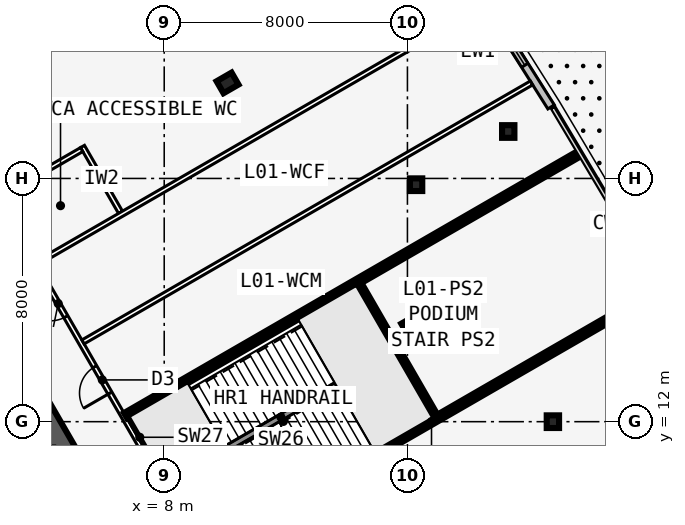
"""IFC4 building model, lengths in metres.
Left out: names, types, materials, properties, quantities, classifications, styles, units other than length and angle.
Written with IfcOpenShell. Run it as: python <this file> out.ifc"""

import sys

from ifc_helpers import new_model, si_unit, direction, frame, frame_2d, origin, origin_2d, place, context, subcontext, project, spatial, rectangle, i_section, extrude, element, fill, save


model = new_model("IFC4")
c1 = context("Model", 3, precision=1e-05, world=origin(), true_north=direction((0.0, 1.0)))
c2 = subcontext(c1, "Body", "Model", "MODEL_VIEW")
j1 = project(units=[si_unit("LENGTHUNIT", "METRE"), si_unit("PLANEANGLEUNIT", "RADIAN")], contexts=[c1])
p1 = place(None, origin())
s1 = spatial("IfcSite", under=j1, at=p1, CompositionType="ELEMENT")
p2 = place(p1, origin())
s2 = spatial("IfcBuilding", under=s1, at=p2, CompositionType="ELEMENT")
p3 = place(p2, frame((0.0, 0.0, 6.0)))
s3 = spatial("IfcBuildingStorey", under=s2, at=p3, CompositionType="ELEMENT", Elevation=6.0)
p4 = place(p3, frame((16.5, -9.526, 0.0), z_axis=(0.0, 0.0, 1.0), x_axis=(-0.499999749417, 0.866025548458, 0.0)))
e1 = element("IfcWall", 1, at=p4, inside=s3, PredefinedType="SHEAR", context=c2, shape_type="SweptSolid", body=[
    extrude(rectangle(XDim=33.0, YDim=0.9, at=frame_2d((16.5, 0.0))), origin(), (0.0, 0.0, 1.0), 5.0),
])
p5 = place(p4, frame((14.15, 0.0, 0.0)))
e2 = element("IfcOpeningElement", 2, at=p5, cuts=e1, PredefinedType="OPENING", context=c2, shape_type="SweptSolid", body=[
    extrude(rectangle(XDim=1.8, YDim=2.13, at=frame_2d((0.9, 1.065))), frame((0.0, 0.46, 0.0), z_axis=(0.0, -1.0, 0.0), x_axis=(1.0, 0.0, 0.0)), (0.0, 0.0, 1.0), 0.92),
])
p6 = place(p4, frame((12.6, 0.0, 0.0)))
e3 = element("IfcOpeningElement", 3, at=p6, cuts=e1, PredefinedType="OPENING", context=c2, shape_type="SweptSolid", body=[
    extrude(rectangle(XDim=1.0, YDim=2.13, at=frame_2d((0.5, 1.065))), frame((0.0, 0.46, 0.0), z_axis=(0.0, -1.0, 0.0), x_axis=(1.0, 0.0, 0.0)), (0.0, 0.0, 1.0), 0.92),
])
p7 = place(p3, frame((5.379, 2.586, 0.0), z_axis=(0.0, 0.0, 1.0), x_axis=(-0.500001375892, 0.866024609411, 0.0)))
e4 = element("IfcWall", 4, at=p7, inside=s3, PredefinedType="SOLIDWALL", context=c2, shape_type="SweptSolid", body=[
    extrude(rectangle(XDim=10.633, YDim=0.25, at=frame_2d((5.316, 0.0))), origin(), (0.0, 0.0, 1.0), 4.75),
])
p8 = place(p7, frame((9.164, 0.0, 0.0)))
e5 = element("IfcOpeningElement", 5, at=p8, cuts=e4, PredefinedType="OPENING", context=c2, shape_type="SweptSolid", body=[
    extrude(rectangle(XDim=0.9, YDim=2.13, at=frame_2d((0.45, 1.065))), frame((0.0, 0.135, 0.0), z_axis=(0.0, -1.0, 0.0), x_axis=(1.0, 0.0, 0.0)), (0.0, 0.0, 1.0), 0.27),
])
p9 = place(p7, frame((1.0, 0.0, 0.0)))
e6 = element("IfcOpeningElement", 6, at=p9, cuts=e4, PredefinedType="OPENING", context=c2, shape_type="SweptSolid", body=[
    extrude(rectangle(XDim=1.1, YDim=2.13, at=frame_2d((0.55, 1.065))), frame((0.0, 0.135, 0.0), z_axis=(0.0, -1.0, 0.0), x_axis=(1.0, 0.0, 0.0)), (0.0, 0.0, 1.0), 0.27),
])
p10 = place(p7, frame((3.9, 0.0, 0.0)))
e7 = element("IfcOpeningElement", 7, at=p10, cuts=e4, PredefinedType="OPENING", context=c2, shape_type="SweptSolid", body=[
    extrude(rectangle(XDim=1.1, YDim=2.13, at=frame_2d((0.55, 1.065))), frame((0.0, 0.135, 0.0), z_axis=(0.0, -1.0, 0.0), x_axis=(1.0, 0.0, 0.0)), (0.0, 0.0, 1.0), 0.27),
])
p11 = place(p7, frame((6.8, 0.0, 0.0)))
e8 = element("IfcOpeningElement", 8, at=p11, cuts=e4, PredefinedType="OPENING", context=c2, shape_type="SweptSolid", body=[
    extrude(rectangle(XDim=1.1, YDim=2.13, at=frame_2d((0.55, 1.065))), frame((0.0, 0.135, 0.0), z_axis=(0.0, -1.0, 0.0), x_axis=(1.0, 0.0, 0.0)), (0.0, 0.0, 1.0), 0.27),
])
for number, where, z_axis, x_axis in (
    (9, (16.137, 15.09, 0.0), (0.0, 0.0, 1.0), (0.866, 0.5, 0.0)),
    (10, (10.083, 23.142, 0.0), (0.0, 0.0, 1.0), (-0.5, 0.866, 0.0)),
):
    element("IfcColumn", number, at=place(p3, frame(where, z_axis=z_axis, x_axis=x_axis)), inside=s3, PredefinedType="COLUMN", context=c2, shape_type="SweptSolid", body=[
        extrude(i_section(OverallWidth=0.455, OverallDepth=0.569, WebThickness=0.078, FlangeThickness=0.125, at=origin_2d()), origin(), (0.0, 0.0, 1.0), 5.0),
    ])
for number, where, z_axis, x_axis in (
    (11, (20.785, 12.0, 0.0), (0.0, 0.0, 1.0), (1.0, 0.0, 0.0)),
    (12, (16.285, 19.794, 0.0), (0.0, 0.0, 1.0), (1.0, 0.0, 0.0)),
    (13, (19.316, 21.544, 0.0), (0.0, 0.0, 1.0), (1.0, 0.0, 0.0)),
):
    element("IfcColumn", number, at=place(p3, frame(where, z_axis=z_axis, x_axis=x_axis)), inside=s3, PredefinedType="COLUMN", context=c2, shape_type="SweptSolid", body=[
        extrude(i_section(OverallWidth=0.406, OverallDepth=0.417, WebThickness=0.03, FlangeThickness=0.048, at=origin_2d()), origin(), (0.0, 0.0, 1.0), 5.0),
    ])
p12 = place(p3, frame((20.726, 22.353, 0.0), z_axis=(0.0, 0.0, 1.0), x_axis=(-0.534212228641, 0.845350397628, 0.0)))
e14 = element("IfcWall", 14, at=p12, inside=s3, PredefinedType="STANDARD", context=c2, shape_type="SweptSolid", body=[
    extrude(rectangle(XDim=9.007, YDim=0.25, at=frame_2d((4.504, 0.0))), origin(), (0.0, 0.0, 1.0), 4.75),
])
p13 = place(p12, frame((1.62, 0.0, 0.6)))
e15 = element("IfcOpeningElement", 15, at=p13, cuts=e14, PredefinedType="OPENING", context=c2, shape_type="SweptSolid", body=[
    extrude(rectangle(XDim=1.8, YDim=3.2, at=frame_2d((0.9, 1.6))), frame((0.0, 0.135, 0.0), z_axis=(0.0, -1.0, 0.0), x_axis=(1.0, 0.0, 0.0)), (0.0, 0.0, 1.0), 0.27),
])
p14 = place(p12, frame((5.539, 0.0, 0.0)))
e16 = element("IfcOpeningElement", 16, at=p14, cuts=e14, PredefinedType="OPENING", context=c2, shape_type="SweptSolid", body=[
    extrude(rectangle(XDim=1.8, YDim=2.4, at=frame_2d((0.9, 1.2))), frame((0.0, 0.135, 0.0), z_axis=(0.0, -1.0, 0.0), x_axis=(1.0, 0.0, 0.0)), (0.0, 0.0, 1.0), 0.27),
])
p15 = place(p3, frame((20.027, -10.985, 0.0), z_axis=(0.0, 0.0, 1.0), x_axis=(-0.500001677587, 0.866024435227, 0.0)))
e17 = element("IfcWall", 17, at=p15, inside=s3, PredefinedType="PARTITIONING", context=c2, shape_type="SweptSolid", body=[
    extrude(rectangle(XDim=39.054, YDim=0.15, at=frame_2d((19.527, 0.0))), origin(), (0.0, 0.0, 1.0), 3.808),
])
p16 = place(p15, frame((10.013, 0.0, 0.0)))
e18 = element("IfcOpeningElement", 18, at=p16, cuts=e17, PredefinedType="OPENING", context=c2, shape_type="SweptSolid", body=[
    extrude(rectangle(XDim=1.8, YDim=2.13, at=frame_2d((0.9, 1.065))), frame((0.0, 0.085, 0.0), z_axis=(0.0, -1.0, 0.0), x_axis=(1.0, 0.0, 0.0)), (0.0, 0.0, 1.0), 0.17),
])
p17 = place(p15, frame((23.227, 0.0, 0.0)))
e19 = element("IfcOpeningElement", 19, at=p17, cuts=e17, PredefinedType="OPENING", context=c2, shape_type="SweptSolid", body=[
    extrude(rectangle(XDim=1.8, YDim=2.13, at=frame_2d((0.9, 1.065))), frame((0.0, 0.085, 0.0), z_axis=(0.0, -1.0, 0.0), x_axis=(1.0, 0.0, 0.0)), (0.0, 0.0, 1.0), 0.17),
])
p18 = place(p15, frame((27.627, 0.0, 0.0)))
e20 = element("IfcOpeningElement", 20, at=p18, cuts=e17, PredefinedType="OPENING", context=c2, shape_type="SweptSolid", body=[
    extrude(rectangle(XDim=1.0, YDim=2.13, at=frame_2d((0.5, 1.065))), frame((0.0, 0.085, 0.0), z_axis=(0.0, -1.0, 0.0), x_axis=(1.0, 0.0, 0.0)), (0.0, 0.0, 1.0), 0.17),
])
p19 = place(p15, frame((30.527, 0.0, 0.0)))
e21 = element("IfcOpeningElement", 21, at=p19, cuts=e17, PredefinedType="OPENING", context=c2, shape_type="SweptSolid", body=[
    extrude(rectangle(XDim=1.0, YDim=2.13, at=frame_2d((0.5, 1.065))), frame((0.0, 0.085, 0.0), z_axis=(0.0, -1.0, 0.0), x_axis=(1.0, 0.0, 0.0)), (0.0, 0.0, 1.0), 0.17),
])
p20 = place(p15, frame((33.277, 0.0, 0.0)))
e22 = element("IfcOpeningElement", 22, at=p20, cuts=e17, PredefinedType="OPENING", context=c2, shape_type="SweptSolid", body=[
    extrude(rectangle(XDim=1.0, YDim=2.13, at=frame_2d((0.5, 1.065))), frame((0.0, 0.085, 0.0), z_axis=(0.0, -1.0, 0.0), x_axis=(1.0, 0.0, 0.0)), (0.0, 0.0, 1.0), 0.17),
])
p21 = place(p15, frame((36.39, 0.0, 0.0)))
e23 = element("IfcOpeningElement", 23, at=p21, cuts=e17, PredefinedType="OPENING", context=c2, shape_type="SweptSolid", body=[
    extrude(rectangle(XDim=1.0, YDim=2.13, at=frame_2d((0.5, 1.065))), frame((0.0, 0.085, 0.0), z_axis=(0.0, -1.0, 0.0), x_axis=(1.0, 0.0, 0.0)), (0.0, 0.0, 1.0), 0.17),
])
p22 = place(p3, frame((9.329, 7.695, 0.0), z_axis=(0.0, 0.0, 1.0), x_axis=(0.866030143687, 0.499991790157, 0.0)))
e24 = element("IfcWall", 24, at=p22, inside=s3, PredefinedType="SHEAR", context=c2, shape_type="SweptSolid", body=[
    extrude(rectangle(XDim=17.236, YDim=0.2, at=frame_2d((8.618, 0.0))), origin(), (0.0, 0.0, 1.0), 5.0),
])
p23 = place(p3, frame((6.729, 12.198, 0.0), z_axis=(0.0, 0.0, 1.0), x_axis=(0.866023831254, 0.500002723692, 0.0)))
e25 = element("IfcWall", 25, at=p23, inside=s3, PredefinedType="SHEAR", context=c2, shape_type="SweptSolid", body=[
    extrude(rectangle(XDim=17.167, YDim=0.2, at=frame_2d((8.583, 0.0))), origin(), (0.0, 0.0, 1.0), 5.0),
])
p24 = place(p3, frame((5.329, 14.623, 0.0), z_axis=(0.0, 0.0, 1.0), x_axis=(0.866023280993, 0.500003676764, 0.0)))
e26 = element("IfcWall", 26, at=p24, inside=s3, PredefinedType="PARTITIONING", context=c2, shape_type="SweptSolid", body=[
    extrude(rectangle(XDim=17.033, YDim=0.15, at=frame_2d((8.517, 0.0))), origin(), (0.0, 0.0, 1.0), 3.808),
])
p25 = place(p3, frame((3.829, 17.221, 0.0), z_axis=(0.0, 0.0, 1.0), x_axis=(0.86602357085, 0.500003174723, 0.0)))
e27 = element("IfcWall", 27, at=p25, inside=s3, PredefinedType="PARTITIONING", context=c2, shape_type="SweptSolid", body=[
    extrude(rectangle(XDim=16.914, YDim=0.15, at=frame_2d((8.457, 0.0))), origin(), (0.0, 0.0, 1.0), 4.75),
])
p26 = place(p3, frame((6.562, 18.886, 0.0), z_axis=(0.0, 0.0, 1.0), x_axis=(-0.500004234368, 0.866022959057, 0.0)))
e28 = element("IfcWall", 28, at=p26, inside=s3, PredefinedType="PARTITIONING", context=c2, shape_type="SweptSolid", body=[
    extrude(rectangle(XDim=2.5, YDim=0.15, at=frame_2d((1.25, 0.0))), origin(), (0.0, 0.0, 1.0), 4.75),
])
p27 = place(p3, frame((2.579, 19.386, 0.0), z_axis=(0.0, 0.0, 1.0), x_axis=(0.866022959057, 0.500004234368, 0.0)))
e29 = element("IfcWall", 29, at=p27, inside=s3, PredefinedType="PARTITIONING", context=c2, shape_type="SweptSolid", body=[
    extrude(rectangle(XDim=3.125, YDim=0.15, at=frame_2d((1.562, 0.0))), origin(), (0.0, 0.0, 1.0), 4.75),
])
p28 = place(p3, frame((16.949, 12.095, 0.0), z_axis=(0.0, 0.0, 1.0), x_axis=(-0.499992051641, 0.866029992723, 0.0)))
e30 = element("IfcWall", 30, at=p28, inside=s3, PredefinedType="SHEAR", context=c2, shape_type="SweptSolid", body=[
    extrude(rectangle(XDim=5.2, YDim=0.2, at=frame_2d((2.6, 0.0))), origin(), (0.0, 0.0, 1.0), 5.0),
])
p29 = place(p3, frame((7.572, 10.838, 0.0), z_axis=(0.0, 0.0, 1.0), x_axis=(-0.499990139034, 0.866031096941, 0.0)))
e31 = element("IfcWall", 31, at=p29, inside=s3, PredefinedType="SOLIDWALL", context=c2, shape_type="SweptSolid", body=[
    extrude(rectangle(XDim=1.5, YDim=0.1, at=frame_2d((0.75, 0.0))), origin(), (0.0, 0.0, 1.0), 5.0),
])
p30 = place(p3, frame((10.023, 11.098, 0.0), z_axis=(0.0, 0.0, 1.0), x_axis=(0.866031452229, 0.49998952364, 0.0)))
e32 = element("IfcWall", 32, at=p30, inside=s3, PredefinedType="SOLIDWALL", context=c2, shape_type="SweptSolid", body=[
    extrude(rectangle(XDim=4.194, YDim=0.2, at=frame_2d((2.097, 0.0))), origin(), (0.0, 0.0, 1.0), 5.0),
])
p31 = place(p13, origin())
e33 = element("IfcWindow", 33, at=p31, inside=s3, PartitioningType="SINGLE_PANEL", PredefinedType="WINDOW", context=c2, shape_type="SweptSolid", body=[
    extrude(rectangle(XDim=1.8, YDim=3.2, at=frame_2d((0.9, 1.6))), frame((0.0, 0.03, 0.0), z_axis=(0.0, -1.0, 0.0), x_axis=(1.0, 0.0, 0.0)), (0.0, 0.0, 1.0), 0.06),
])
fill(e15, e33)
p32 = place(p18, origin())
e34 = element("IfcDoor", 34, at=p32, inside=s3, OperationType="SINGLE_SWING_LEFT", PredefinedType="DOOR", context=c2, shape_type="SweptSolid", body=[
    extrude(rectangle(XDim=1.0, YDim=2.13, at=frame_2d((0.5, 1.065))), frame((0.0, 0.025, 0.0), z_axis=(0.0, -1.0, 0.0), x_axis=(1.0, 0.0, 0.0)), (0.0, 0.0, 1.0), 0.05),
])
fill(e20, e34)
p33 = place(p19, origin())
e35 = element("IfcDoor", 35, at=p33, inside=s3, OperationType="SINGLE_SWING_RIGHT", PredefinedType="DOOR", context=c2, shape_type="SweptSolid", body=[
    extrude(rectangle(XDim=1.0, YDim=2.13, at=frame_2d((0.5, 1.065))), frame((0.0, 0.025, 0.0), z_axis=(0.0, -1.0, 0.0), x_axis=(1.0, 0.0, 0.0)), (0.0, 0.0, 1.0), 0.05),
])
fill(e21, e35)
save(model, sys.argv[1])
